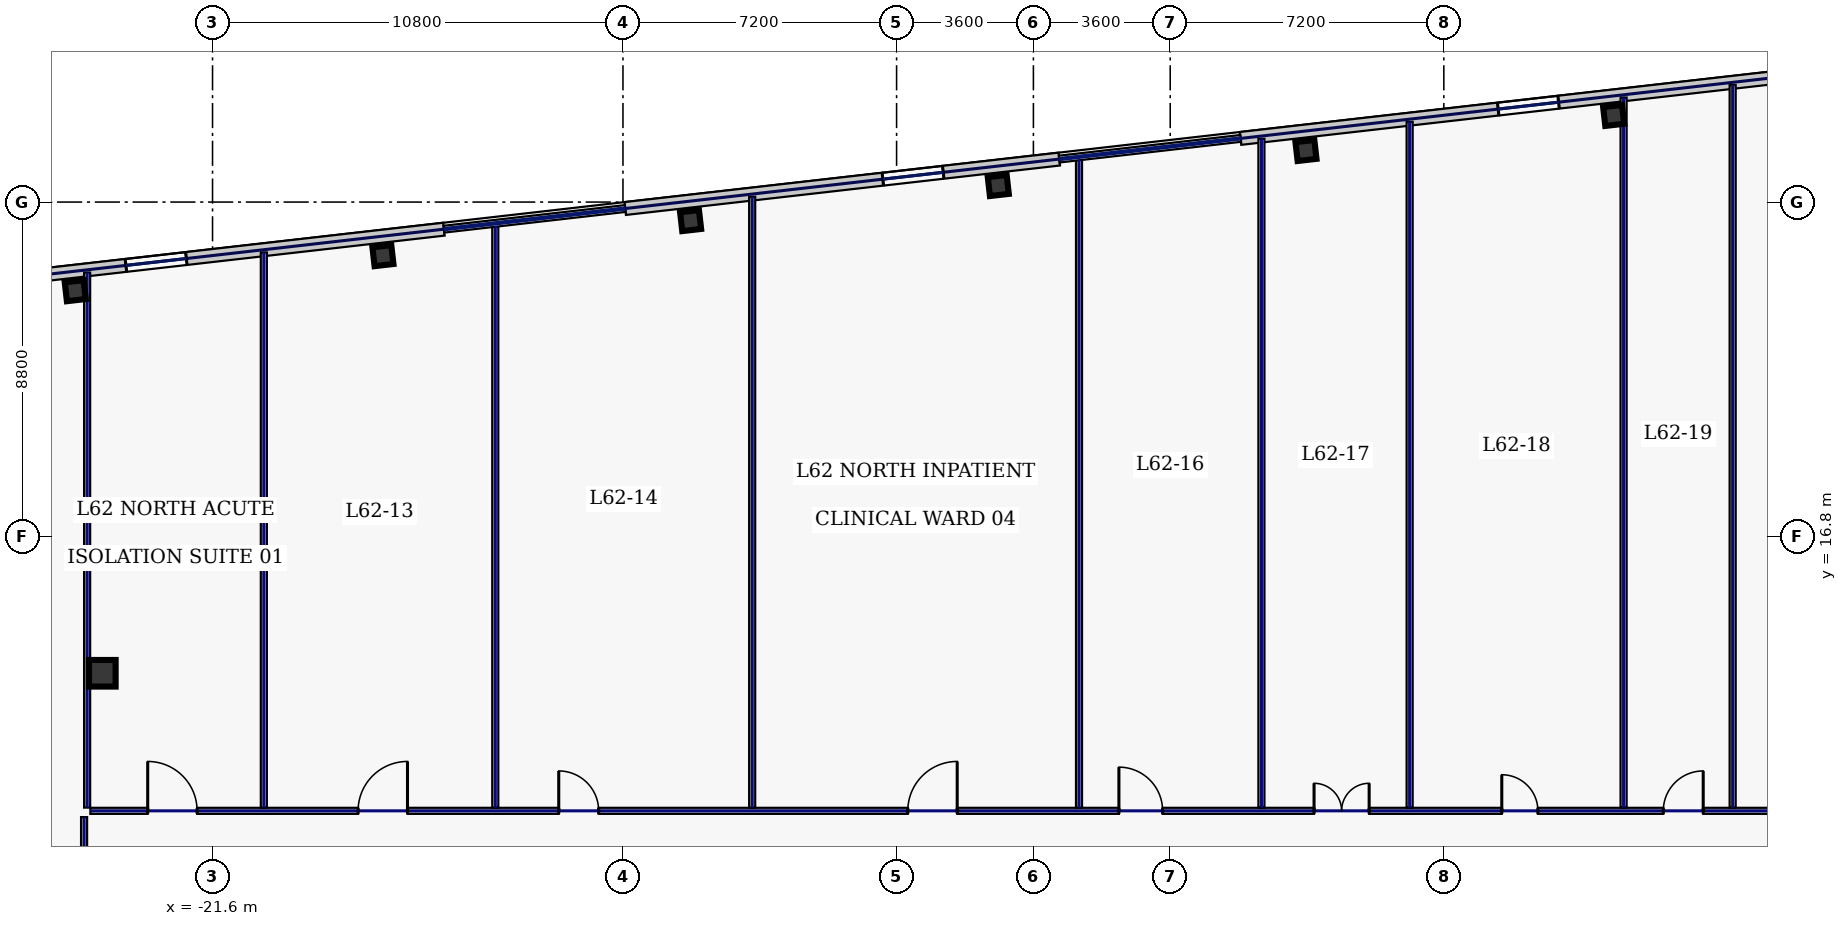
"""IFC4 building model, lengths in metres.
Left out: names, types, materials, properties, quantities, classifications, styles, units other than length and angle.
Written with IfcOpenShell. Run it as: python <this file> out.ifc"""

import sys

from ifc_helpers import new_model, si_unit, direction, frame, frame_2d, origin, origin_2d, place, context, subcontext, project, spatial, rectangle, hollow_rectangle, extrude, element, fill, save


model = new_model("IFC4")
c1 = context("Model", 3, precision=1e-05, world=origin(), true_north=direction((0.0, 1.0)))
c2 = subcontext(c1, "Body", "Model", "MODEL_VIEW")
j1 = project(units=[si_unit("LENGTHUNIT", "METRE"), si_unit("PLANEANGLEUNIT", "RADIAN")], contexts=[c1])
p1 = place(None, origin())
s1 = spatial("IfcSite", under=j1, at=p1, CompositionType="ELEMENT")
p2 = place(p1, origin())
s2 = spatial("IfcBuilding", under=s1, at=p2, CompositionType="ELEMENT")
p3 = place(p2, frame((0.0, 0.0, 267.0)))
s3 = spatial("IfcBuildingStorey", under=s2, at=p3, CompositionType="ELEMENT", Elevation=267.0)
p4 = place(p3, frame((-24.5, 13.2, 0.0), z_axis=(0.0, 0.0, 1.0), x_axis=(1.0, 0.0, 0.0)))
e1 = element("IfcColumn", 1, at=p4, inside=s3, PredefinedType="COLUMN", context=c2, shape_type="SweptSolid", body=[
    extrude(hollow_rectangle(XDim=0.7, YDim=0.7, WallThickness=0.032, at=origin_2d()), origin(), (0.0, 0.0, 1.0), 3.68),
])
for number, where, z_axis, x_axis in (
    (2, (15.269, 27.88, 0.0), (0.0, 0.0, 1.0), (0.994, 0.113, 0.0)),
    (3, (7.172, 26.958, 0.0), (0.0, 0.0, 1.0), (0.994, 0.113, 0.0)),
    (4, (-0.924, 26.035, 0.0), (0.0, 0.0, 1.0), (0.994, 0.113, 0.0)),
    (5, (-9.02, 25.113, 0.0), (0.0, 0.0, 1.0), (0.994, 0.113, 0.0)),
    (6, (-17.116, 24.19, 0.0), (0.0, 0.0, 1.0), (0.994, 0.113, 0.0)),
    (7, (-25.212, 23.268, 0.0), (0.0, 0.0, 1.0), (0.994, 0.113, 0.0)),
):
    element("IfcColumn", number, at=place(p3, frame(where, z_axis=z_axis, x_axis=x_axis)), inside=s3, PredefinedType="COLUMN", context=c2, shape_type="SweptSolid", body=[
        extrude(hollow_rectangle(XDim=0.5, YDim=0.5, WallThickness=0.025, at=origin_2d()), origin(), (0.0, 0.0, 1.0), 3.68),
    ])
p5 = place(p3, frame((23.983, 29.386, 0.0), z_axis=(0.0, 0.0, 1.0), x_axis=(-0.993572271362, -0.113199565282, 0.0)))
e8 = element("IfcWall", 8, at=p5, inside=s3, PredefinedType="STANDARD", context=c2, shape_type="SweptSolid", body=[
    extrude(rectangle(XDim=18.651, YDim=0.34, at=frame_2d((9.326, 0.0))), origin(), (0.0, 0.0, 1.0), 3.68),
])
p6 = place(p5, frame((10.229, 0.0, 0.22)))
e9 = element("IfcOpeningElement", 9, at=p6, cuts=e8, PredefinedType="OPENING", context=c2, shape_type="SweptSolid", body=[
    extrude(rectangle(XDim=1.6, YDim=1.2, at=frame_2d((0.8, 0.6))), frame((0.0, 0.18, 0.0), z_axis=(0.0, -1.0, 0.0), x_axis=(1.0, 0.0, 0.0)), (0.0, 0.0, 1.0), 0.36),
])
p7 = place(p5, frame((2.336, 0.0, 0.22)))
e10 = element("IfcOpeningElement", 10, at=p7, cuts=e8, PredefinedType="OPENING", context=c2, shape_type="SweptSolid", body=[
    extrude(rectangle(XDim=1.6, YDim=1.2, at=frame_2d((0.8, 0.6))), frame((0.0, 0.18, 0.0), z_axis=(0.0, -1.0, 0.0), x_axis=(1.0, 0.0, 0.0)), (0.0, 0.0, 1.0), 0.36),
])
p8 = place(p3, frame((0.682, 26.731, 0.0), z_axis=(0.0, 0.0, 1.0), x_axis=(-0.993571968199, -0.113202226169, 0.0)))
e11 = element("IfcWall", 11, at=p8, inside=s3, PredefinedType="STANDARD", context=c2, shape_type="SweptSolid", body=[
    extrude(rectangle(XDim=11.497, YDim=0.34, at=frame_2d((5.749, 0.0))), origin(), (0.0, 0.0, 1.0), 3.68),
])
p9 = place(p8, frame((3.074, 0.0, 0.22)))
e12 = element("IfcOpeningElement", 12, at=p9, cuts=e11, PredefinedType="OPENING", context=c2, shape_type="SweptSolid", body=[
    extrude(rectangle(XDim=1.6, YDim=1.2, at=frame_2d((0.8, 0.6))), frame((0.0, 0.18, 0.0), z_axis=(0.0, -1.0, 0.0), x_axis=(1.0, 0.0, 0.0)), (0.0, 0.0, 1.0), 0.36),
])
p10 = place(p3, frame((-15.51, 24.886, 0.0), z_axis=(0.0, 0.0, 1.0), x_axis=(-0.993572271362, -0.113199565282, 0.0)))
e13 = element("IfcWall", 13, at=p10, inside=s3, PredefinedType="STANDARD", context=c2, shape_type="SweptSolid", body=[
    extrude(rectangle(XDim=18.651, YDim=0.34, at=frame_2d((9.326, 0.0))), origin(), (0.0, 0.0, 1.0), 3.68),
])
p11 = place(p10, frame((14.971, 0.0, 0.22)))
e14 = element("IfcOpeningElement", 14, at=p11, cuts=e13, PredefinedType="OPENING", context=c2, shape_type="SweptSolid", body=[
    extrude(rectangle(XDim=1.6, YDim=1.2, at=frame_2d((0.8, 0.6))), frame((0.0, 0.18, 0.0), z_axis=(0.0, -1.0, 0.0), x_axis=(1.0, 0.0, 0.0)), (0.0, 0.0, 1.0), 0.36),
])
p12 = place(p10, frame((11.223, 0.0, 0.22)))
e15 = element("IfcOpeningElement", 15, at=p12, cuts=e13, PredefinedType="OPENING", context=c2, shape_type="SweptSolid", body=[
    extrude(rectangle(XDim=1.6, YDim=1.2, at=frame_2d((0.8, 0.6))), frame((0.0, 0.18, 0.0), z_axis=(0.0, -1.0, 0.0), x_axis=(1.0, 0.0, 0.0)), (0.0, 0.0, 1.0), 0.36),
])
p13 = place(p10, frame((6.823, 0.0, 0.22)))
e16 = element("IfcOpeningElement", 16, at=p13, cuts=e13, PredefinedType="OPENING", context=c2, shape_type="SweptSolid", body=[
    extrude(rectangle(XDim=1.6, YDim=1.2, at=frame_2d((0.8, 0.6))), frame((0.0, 0.18, 0.0), z_axis=(0.0, -1.0, 0.0), x_axis=(1.0, 0.0, 0.0)), (0.0, 0.0, 1.0), 0.36),
])
p14 = place(p3, frame((-24.98, -9.215, 0.0), z_axis=(0.0, 0.0, 1.0), x_axis=(0.0, 1.0, 0.0)))
e17 = element("IfcWall", 17, at=p14, inside=s3, PredefinedType="PARTITIONING", context=c2, shape_type="SweptSolid", body=[
    extrude(rectangle(XDim=18.63, YDim=0.16, at=frame_2d((9.315, 0.0))), origin(), (0.0, 0.0, 1.0), 3.68),
])
p15 = place(p14, frame((1.769, 0.0, 0.0)))
e18 = element("IfcOpeningElement", 18, at=p15, cuts=e17, PredefinedType="OPENING", context=c2, shape_type="SweptSolid", body=[
    extrude(rectangle(XDim=0.95, YDim=2.2, at=frame_2d((0.475, 1.1))), frame((0.0, 0.09, 0.0), z_axis=(0.0, -1.0, 0.0), x_axis=(1.0, 0.0, 0.0)), (0.0, 0.0, 1.0), 0.18),
])
p16 = place(p14, frame((6.85, 0.0, 0.0)))
e19 = element("IfcOpeningElement", 19, at=p16, cuts=e17, PredefinedType="OPENING", context=c2, shape_type="SweptSolid", body=[
    extrude(rectangle(XDim=0.95, YDim=2.2, at=frame_2d((0.475, 1.1))), frame((0.0, 0.09, 0.0), z_axis=(0.0, -1.0, 0.0), x_axis=(1.0, 0.0, 0.0)), (0.0, 0.0, 1.0), 0.18),
])
p17 = place(p14, frame((12.05, 0.0, 0.0)))
e20 = element("IfcOpeningElement", 20, at=p17, cuts=e17, PredefinedType="OPENING", context=c2, shape_type="SweptSolid", body=[
    extrude(rectangle(XDim=0.95, YDim=2.2, at=frame_2d((0.475, 1.1))), frame((0.0, 0.09, 0.0), z_axis=(0.0, -1.0, 0.0), x_axis=(1.0, 0.0, 0.0)), (0.0, 0.0, 1.0), 0.18),
])
p18 = place(p14, frame((16.821, 0.0, 0.0)))
e21 = element("IfcOpeningElement", 21, at=p18, cuts=e17, PredefinedType="OPENING", context=c2, shape_type="SweptSolid", body=[
    extrude(rectangle(XDim=0.95, YDim=2.2, at=frame_2d((0.475, 1.1))), frame((0.0, 0.09, 0.0), z_axis=(0.0, -1.0, 0.0), x_axis=(1.0, 0.0, 0.0)), (0.0, 0.0, 1.0), 0.18),
])
p19 = place(p3, frame((-24.815, 9.58, 0.0), z_axis=(0.0, 0.0, 1.0), x_axis=(1.0, 0.0, 0.0)))
e22 = element("IfcWall", 22, at=p19, inside=s3, PredefinedType="PARTITIONING", context=c2, shape_type="SweptSolid", body=[
    extrude(rectangle(XDim=49.63, YDim=0.16, at=frame_2d((24.815, 0.0))), origin(), (0.0, 0.0, 1.0), 3.68),
])
p20 = place(p19, frame((1.509, 0.0, 0.0)))
e23 = element("IfcOpeningElement", 23, at=p20, cuts=e22, PredefinedType="OPENING", context=c2, shape_type="SweptSolid", body=[
    extrude(rectangle(XDim=1.3, YDim=2.2, at=frame_2d((0.65, 1.1))), frame((0.0, 0.09, 0.0), z_axis=(0.0, -1.0, 0.0), x_axis=(1.0, 0.0, 0.0)), (0.0, 0.0, 1.0), 0.18),
])
p21 = place(p19, frame((7.045, 0.0, 0.0)))
e24 = element("IfcOpeningElement", 24, at=p21, cuts=e22, PredefinedType="OPENING", context=c2, shape_type="SweptSolid", body=[
    extrude(rectangle(XDim=1.3, YDim=2.2, at=frame_2d((0.65, 1.1))), frame((0.0, 0.09, 0.0), z_axis=(0.0, -1.0, 0.0), x_axis=(1.0, 0.0, 0.0)), (0.0, 0.0, 1.0), 0.18),
])
p22 = place(p19, frame((12.325, 0.0, 0.0)))
e25 = element("IfcOpeningElement", 25, at=p22, cuts=e22, PredefinedType="OPENING", context=c2, shape_type="SweptSolid", body=[
    extrude(rectangle(XDim=1.05, YDim=2.2, at=frame_2d((0.525, 1.1))), frame((0.0, 0.09, 0.0), z_axis=(0.0, -1.0, 0.0), x_axis=(1.0, 0.0, 0.0)), (0.0, 0.0, 1.0), 0.18),
])
p23 = place(p19, frame((21.51, 0.0, 0.0)))
e26 = element("IfcOpeningElement", 26, at=p23, cuts=e22, PredefinedType="OPENING", context=c2, shape_type="SweptSolid", body=[
    extrude(rectangle(XDim=1.3, YDim=2.2, at=frame_2d((0.65, 1.1))), frame((0.0, 0.09, 0.0), z_axis=(0.0, -1.0, 0.0), x_axis=(1.0, 0.0, 0.0)), (0.0, 0.0, 1.0), 0.18),
])
p24 = place(p19, frame((27.065, 0.0, 0.0)))
e27 = element("IfcOpeningElement", 27, at=p24, cuts=e22, PredefinedType="OPENING", context=c2, shape_type="SweptSolid", body=[
    extrude(rectangle(XDim=1.15, YDim=2.2, at=frame_2d((0.575, 1.1))), frame((0.0, 0.09, 0.0), z_axis=(0.0, -1.0, 0.0), x_axis=(1.0, 0.0, 0.0)), (0.0, 0.0, 1.0), 0.18),
])
p25 = place(p19, frame((32.2, 0.0, 0.0)))
e28 = element("IfcOpeningElement", 28, at=p25, cuts=e22, PredefinedType="OPENING", context=c2, shape_type="SweptSolid", body=[
    extrude(rectangle(XDim=1.45, YDim=2.2, at=frame_2d((0.725, 1.1))), frame((0.0, 0.09, 0.0), z_axis=(0.0, -1.0, 0.0), x_axis=(1.0, 0.0, 0.0)), (0.0, 0.0, 1.0), 0.18),
])
p26 = place(p19, frame((37.14, 0.0, 0.0)))
e29 = element("IfcOpeningElement", 29, at=p26, cuts=e22, PredefinedType="OPENING", context=c2, shape_type="SweptSolid", body=[
    extrude(rectangle(XDim=0.95, YDim=2.2, at=frame_2d((0.475, 1.1))), frame((0.0, 0.09, 0.0), z_axis=(0.0, -1.0, 0.0), x_axis=(1.0, 0.0, 0.0)), (0.0, 0.0, 1.0), 0.18),
])
p27 = place(p19, frame((41.39, 0.0, 0.0)))
e30 = element("IfcOpeningElement", 30, at=p27, cuts=e22, PredefinedType="OPENING", context=c2, shape_type="SweptSolid", body=[
    extrude(rectangle(XDim=1.05, YDim=2.2, at=frame_2d((0.525, 1.1))), frame((0.0, 0.09, 0.0), z_axis=(0.0, -1.0, 0.0), x_axis=(1.0, 0.0, 0.0)), (0.0, 0.0, 1.0), 0.18),
])
p28 = place(p19, frame((45.881, 0.0, 0.0)))
e31 = element("IfcOpeningElement", 31, at=p28, cuts=e22, PredefinedType="OPENING", context=c2, shape_type="SweptSolid", body=[
    extrude(rectangle(XDim=0.95, YDim=2.2, at=frame_2d((0.475, 1.1))), frame((0.0, 0.09, 0.0), z_axis=(0.0, -1.0, 0.0), x_axis=(1.0, 0.0, 0.0)), (0.0, 0.0, 1.0), 0.18),
])
p29 = place(p3, frame((-24.9, 9.665, 0.0), z_axis=(0.0, 0.0, 1.0), x_axis=(0.0, 1.0, 0.0)))
e32 = element("IfcWall", 32, at=p29, inside=s3, PredefinedType="PARTITIONING", context=c2, shape_type="SweptSolid", body=[
    extrude(rectangle(XDim=14.081, YDim=0.16, at=frame_2d((7.041, 0.0))), origin(), (0.0, 0.0, 1.0), 3.68),
])
p30 = place(p3, frame((-20.25, 9.665, 0.0), z_axis=(0.0, 0.0, 1.0), x_axis=(0.0, 1.0, 0.0)))
e33 = element("IfcWall", 33, at=p30, inside=s3, PredefinedType="PARTITIONING", context=c2, shape_type="SweptSolid", body=[
    extrude(rectangle(XDim=14.611, YDim=0.16, at=frame_2d((7.306, 0.0))), origin(), (0.0, 0.0, 1.0), 3.68),
])
p31 = place(p3, frame((-14.16, 9.665, 0.0), z_axis=(0.0, 0.0, 1.0), x_axis=(0.0, 1.0, 0.0)))
e34 = element("IfcWall", 34, at=p31, inside=s3, PredefinedType="PARTITIONING", context=c2, shape_type="SweptSolid", body=[
    extrude(rectangle(XDim=15.305, YDim=0.16, at=frame_2d((7.652, 0.0))), origin(), (0.0, 0.0, 1.0), 3.68),
])
p32 = place(p3, frame((-7.4, 9.665, 0.0), z_axis=(0.0, 0.0, 1.0), x_axis=(0.0, 1.0, 0.0)))
e35 = element("IfcWall", 35, at=p32, inside=s3, PredefinedType="PARTITIONING", context=c2, shape_type="SweptSolid", body=[
    extrude(rectangle(XDim=16.075, YDim=0.16, at=frame_2d((8.038, 0.0))), origin(), (0.0, 0.0, 1.0), 3.68),
])
p33 = place(p3, frame((1.2, 9.665, 0.0), z_axis=(0.0, 0.0, 1.0), x_axis=(0.0, 1.0, 0.0)))
e36 = element("IfcWall", 36, at=p33, inside=s3, PredefinedType="PARTITIONING", context=c2, shape_type="SweptSolid", body=[
    extrude(rectangle(XDim=17.055, YDim=0.16, at=frame_2d((8.527, 0.0))), origin(), (0.0, 0.0, 1.0), 3.68),
])
p34 = place(p3, frame((9.9, 9.665, 0.0), z_axis=(0.0, 0.0, 1.0), x_axis=(0.0, 1.0, 0.0)))
e37 = element("IfcWall", 37, at=p34, inside=s3, PredefinedType="PARTITIONING", context=c2, shape_type="SweptSolid", body=[
    extrude(rectangle(XDim=18.046, YDim=0.16, at=frame_2d((9.023, 0.0))), origin(), (0.0, 0.0, 1.0), 3.68),
])
p35 = place(p3, frame((18.4, 9.665, 0.0), z_axis=(0.0, 0.0, 1.0), x_axis=(0.0, 1.0, 0.0)))
e38 = element("IfcWall", 38, at=p35, inside=s3, PredefinedType="PARTITIONING", context=c2, shape_type="SweptSolid", body=[
    extrude(rectangle(XDim=19.015, YDim=0.16, at=frame_2d((9.507, 0.0))), origin(), (0.0, 0.0, 1.0), 3.68),
])
p36 = place(p3, frame((6.0, 9.665, 0.0), z_axis=(0.0, 0.0, 1.0), x_axis=(0.0, 1.0, 0.0)))
e39 = element("IfcWall", 39, at=p36, inside=s3, PredefinedType="PARTITIONING", context=c2, shape_type="SweptSolid", body=[
    extrude(rectangle(XDim=17.602, YDim=0.16, at=frame_2d((8.801, 0.0))), origin(), (0.0, 0.0, 1.0), 3.68),
])
p37 = place(p3, frame((15.53, 9.665, 0.0), z_axis=(0.0, 0.0, 1.0), x_axis=(0.0, 1.0, 0.0)))
e40 = element("IfcWall", 40, at=p37, inside=s3, PredefinedType="PARTITIONING", context=c2, shape_type="SweptSolid", body=[
    extrude(rectangle(XDim=18.688, YDim=0.16, at=frame_2d((9.344, 0.0))), origin(), (0.0, 0.0, 1.0), 3.68),
])
p38 = place(p6, origin())
e41 = element("IfcWindow", 41, at=p38, inside=s3, PartitioningType="SINGLE_PANEL", PredefinedType="WINDOW", context=c2, shape_type="SweptSolid", body=[
    extrude(rectangle(XDim=1.6, YDim=1.2, at=frame_2d((0.8, 0.6))), frame((0.0, 0.03, 0.0), z_axis=(0.0, -1.0, 0.0), x_axis=(1.0, 0.0, 0.0)), (0.0, 0.0, 1.0), 0.06),
])
fill(e9, e41)
p39 = place(p9, origin())
e42 = element("IfcWindow", 42, at=p39, inside=s3, PartitioningType="SINGLE_PANEL", PredefinedType="WINDOW", context=c2, shape_type="SweptSolid", body=[
    extrude(rectangle(XDim=1.6, YDim=1.2, at=frame_2d((0.8, 0.6))), frame((0.0, 0.03, 0.0), z_axis=(0.0, -1.0, 0.0), x_axis=(1.0, 0.0, 0.0)), (0.0, 0.0, 1.0), 0.06),
])
fill(e12, e42)
p40 = place(p13, origin())
e43 = element("IfcWindow", 43, at=p40, inside=s3, PartitioningType="SINGLE_PANEL", PredefinedType="WINDOW", context=c2, shape_type="SweptSolid", body=[
    extrude(rectangle(XDim=1.6, YDim=1.2, at=frame_2d((0.8, 0.6))), frame((0.0, 0.03, 0.0), z_axis=(0.0, -1.0, 0.0), x_axis=(1.0, 0.0, 0.0)), (0.0, 0.0, 1.0), 0.06),
])
fill(e16, e43)
p41 = place(p20, origin())
e44 = element("IfcDoor", 44, at=p41, inside=s3, OperationType="SINGLE_SWING_LEFT", PredefinedType="DOOR", context=c2, shape_type="SweptSolid", body=[
    extrude(rectangle(XDim=1.3, YDim=2.2, at=frame_2d((0.65, 1.1))), frame((0.0, 0.025, 0.0), z_axis=(0.0, -1.0, 0.0), x_axis=(1.0, 0.0, 0.0)), (0.0, 0.0, 1.0), 0.05),
])
fill(e23, e44)
p42 = place(p21, origin())
e45 = element("IfcDoor", 45, at=p42, inside=s3, OperationType="SINGLE_SWING_RIGHT", PredefinedType="DOOR", context=c2, shape_type="SweptSolid", body=[
    extrude(rectangle(XDim=1.3, YDim=2.2, at=frame_2d((0.65, 1.1))), frame((0.0, 0.025, 0.0), z_axis=(0.0, -1.0, 0.0), x_axis=(1.0, 0.0, 0.0)), (0.0, 0.0, 1.0), 0.05),
])
fill(e24, e45)
p43 = place(p22, origin())
e46 = element("IfcDoor", 46, at=p43, inside=s3, OperationType="SINGLE_SWING_LEFT", PredefinedType="DOOR", context=c2, shape_type="SweptSolid", body=[
    extrude(rectangle(XDim=1.05, YDim=2.2, at=frame_2d((0.525, 1.1))), frame((0.0, 0.025, 0.0), z_axis=(0.0, -1.0, 0.0), x_axis=(1.0, 0.0, 0.0)), (0.0, 0.0, 1.0), 0.05),
])
fill(e25, e46)
p44 = place(p23, origin())
e47 = element("IfcDoor", 47, at=p44, inside=s3, OperationType="SINGLE_SWING_RIGHT", PredefinedType="DOOR", context=c2, shape_type="SweptSolid", body=[
    extrude(rectangle(XDim=1.3, YDim=2.2, at=frame_2d((0.65, 1.1))), frame((0.0, 0.025, 0.0), z_axis=(0.0, -1.0, 0.0), x_axis=(1.0, 0.0, 0.0)), (0.0, 0.0, 1.0), 0.05),
])
fill(e26, e47)
p45 = place(p24, origin())
e48 = element("IfcDoor", 48, at=p45, inside=s3, OperationType="SINGLE_SWING_LEFT", PredefinedType="DOOR", context=c2, shape_type="SweptSolid", body=[
    extrude(rectangle(XDim=1.15, YDim=2.2, at=frame_2d((0.575, 1.1))), frame((0.0, 0.025, 0.0), z_axis=(0.0, -1.0, 0.0), x_axis=(1.0, 0.0, 0.0)), (0.0, 0.0, 1.0), 0.05),
])
fill(e27, e48)
p46 = place(p25, origin())
e49 = element("IfcDoor", 49, at=p46, inside=s3, OperationType="DOUBLE_SWING_LEFT", PredefinedType="DOOR", context=c2, shape_type="SweptSolid", body=[
    extrude(rectangle(XDim=1.45, YDim=2.2, at=frame_2d((0.725, 1.1))), frame((0.0, 0.025, 0.0), z_axis=(0.0, -1.0, 0.0), x_axis=(1.0, 0.0, 0.0)), (0.0, 0.0, 1.0), 0.05),
])
fill(e28, e49)
p47 = place(p26, origin())
e50 = element("IfcDoor", 50, at=p47, inside=s3, OperationType="SINGLE_SWING_LEFT", PredefinedType="DOOR", context=c2, shape_type="SweptSolid", body=[
    extrude(rectangle(XDim=0.95, YDim=2.2, at=frame_2d((0.475, 1.1))), frame((0.0, 0.025, 0.0), z_axis=(0.0, -1.0, 0.0), x_axis=(1.0, 0.0, 0.0)), (0.0, 0.0, 1.0), 0.05),
])
fill(e29, e50)
p48 = place(p27, origin())
e51 = element("IfcDoor", 51, at=p48, inside=s3, OperationType="SINGLE_SWING_RIGHT", PredefinedType="DOOR", context=c2, shape_type="SweptSolid", body=[
    extrude(rectangle(XDim=1.05, YDim=2.2, at=frame_2d((0.525, 1.1))), frame((0.0, 0.025, 0.0), z_axis=(0.0, -1.0, 0.0), x_axis=(1.0, 0.0, 0.0)), (0.0, 0.0, 1.0), 0.05),
])
fill(e30, e51)
save(model, sys.argv[1])
